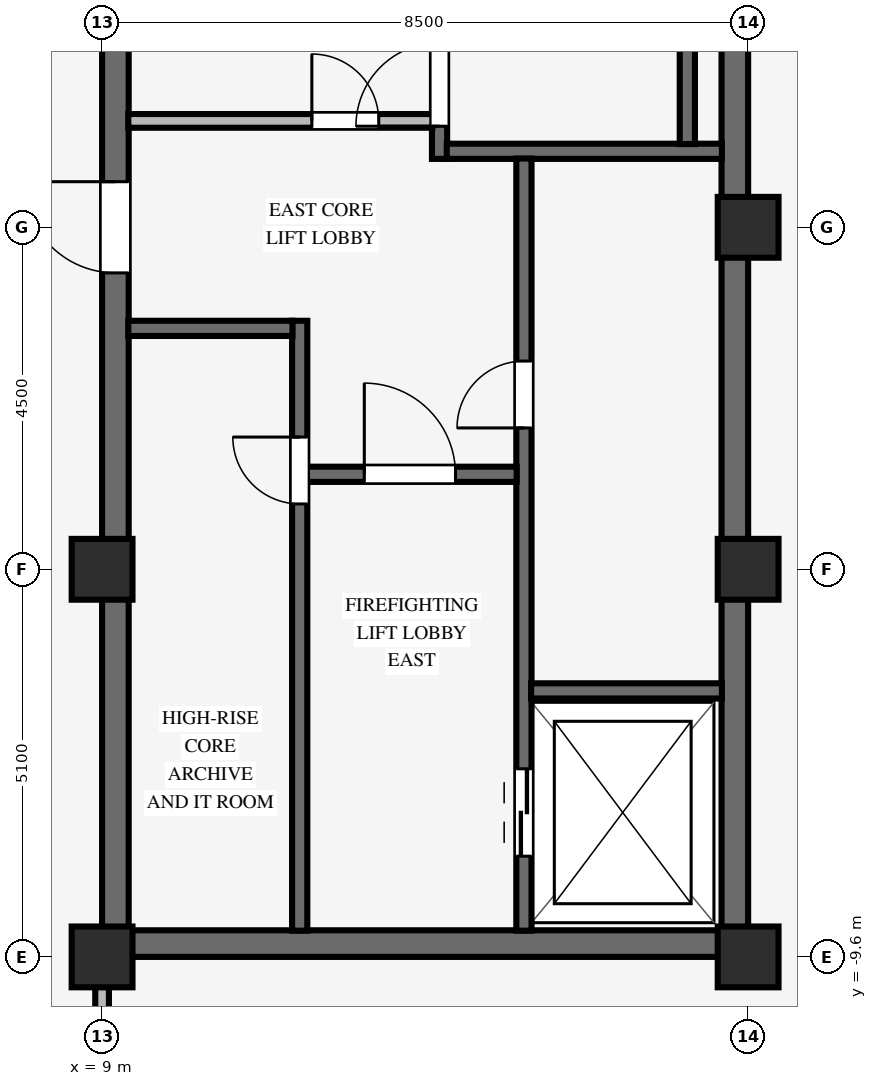
"""IFC4 building model, lengths in metres.
Left out: names, types, materials, properties, quantities, classifications, styles, units other than length and angle.
Written with IfcOpenShell. Run it as: python <this file> out.ifc"""

import sys

from ifc_helpers import new_model, si_unit, direction, frame, frame_2d, origin, origin_2d, place, context, subcontext, project, spatial, rectangle, extrude, source, transform, mapped, element, fill, save


model = new_model("IFC4")
c1 = context("Model", 3, precision=1e-05, world=origin(), true_north=direction((0.0, 1.0)))
c2 = subcontext(c1, "Body", "Model", "MODEL_VIEW")
j1 = project(units=[si_unit("LENGTHUNIT", "METRE"), si_unit("PLANEANGLEUNIT", "RADIAN")], contexts=[c1])
p1 = place(None, origin())
s1 = spatial("IfcSite", under=j1, at=p1, CompositionType="ELEMENT")
p2 = place(p1, origin())
s2 = spatial("IfcBuilding", under=s1, at=p2, CompositionType="ELEMENT")
p3 = place(p2, frame((0.0, 0.0, 245.65)))
s3 = spatial("IfcBuildingStorey", under=s2, at=p3, CompositionType="ELEMENT", Elevation=245.65)
p4 = place(p3, frame((9.0, -9.425, 0.0), z_axis=(0.0, 0.0, 1.0), x_axis=(1.0, 0.0, 0.0)))
e1 = element("IfcWall", 1, at=p4, inside=s3, PredefinedType="SHEAR", context=c2, shape_type="SweptSolid", body=[
    extrude(rectangle(XDim=8.5, YDim=0.35, at=frame_2d((4.25, 0.0))), origin(), (0.0, 0.0, 1.0), 3.37),
])
p5 = place(p3, frame((9.175, -9.255, 0.0), z_axis=(0.0, 0.0, 1.0), x_axis=(0.0, 1.0, 0.0)))
e2 = element("IfcWall", 2, at=p5, inside=s3, PredefinedType="SHEAR", context=c2, shape_type="SweptSolid", body=[
    extrude(rectangle(XDim=18.51, YDim=0.35, at=frame_2d((9.255, 0.0))), origin(), (0.0, 0.0, 1.0), 3.37),
])
p6 = place(p5, frame((8.655, 0.0, 0.0)))
e3 = element("IfcOpeningElement", 3, at=p6, cuts=e2, PredefinedType="OPENING", context=c2, shape_type="SweptSolid", body=[
    extrude(rectangle(XDim=1.2, YDim=2.15, at=frame_2d((0.6, 1.075))), frame((0.0, 0.185, 0.0), z_axis=(0.0, -1.0, 0.0), x_axis=(1.0, 0.0, 0.0)), (0.0, 0.0, 1.0), 0.37),
])
p7 = place(p3, frame((17.325, -9.255, 0.0), z_axis=(0.0, 0.0, 1.0), x_axis=(0.0, 1.0, 0.0)))
e4 = element("IfcWall", 4, at=p7, inside=s3, PredefinedType="SHEAR", context=c2, shape_type="SweptSolid", body=[
    extrude(rectangle(XDim=18.51, YDim=0.35, at=frame_2d((9.255, 0.0))), origin(), (0.0, 0.0, 1.0), 3.37),
])
for number, where, z_axis, x_axis in (
    (5, (9.0, -9.6, 0.0), (0.0, 0.0, 1.0), (1.0, 0.0, 0.0)),
    (6, (9.0, -4.5, 0.0), (0.0, 0.0, 1.0), (1.0, 0.0, 0.0)),
    (7, (17.5, -9.6, 0.0), (0.0, 0.0, 1.0), (1.0, 0.0, 0.0)),
    (8, (17.5, -4.5, 0.0), (0.0, 0.0, 1.0), (1.0, 0.0, 0.0)),
    (9, (17.5, 0.0, 0.0), (0.0, 0.0, 1.0), (1.0, 0.0, 0.0)),
):
    element("IfcColumn", number, at=place(p3, frame(where, z_axis=z_axis, x_axis=x_axis)), inside=s3, PredefinedType="COLUMN", context=c2, shape_type="SweptSolid", body=[
        extrude(rectangle(XDim=0.8, YDim=0.8, at=origin_2d()), origin(), (0.0, 0.0, 1.0), 3.37),
    ])
p8 = place(p3, frame((13.44, 0.9, 0.0), z_axis=(0.0, 0.0, 1.0), x_axis=(0.0, 1.0, 0.0)))
e10 = element("IfcWall", 10, at=p8, inside=s3, PredefinedType="SHEAR", context=c2, shape_type="SweptSolid", body=[
    extrude(rectangle(XDim=8.355, YDim=0.2, at=frame_2d((4.177, 0.0))), origin(), (0.0, 0.0, 1.0), 3.37),
])
p9 = place(p8, frame((0.43, 0.0, 0.0)))
e11 = element("IfcOpeningElement", 11, at=p9, cuts=e10, PredefinedType="OPENING", context=c2, shape_type="SweptSolid", body=[
    extrude(rectangle(XDim=1.1, YDim=2.15, at=frame_2d((0.55, 1.075))), frame((0.0, 0.11, 0.0), z_axis=(0.0, -1.0, 0.0), x_axis=(1.0, 0.0, 0.0)), (0.0, 0.0, 1.0), 0.22),
])
p10 = place(p3, frame((13.535, 1.0, 0.0), z_axis=(0.0, 0.0, 1.0), x_axis=(1.0, 0.0, 0.0)))
e12 = element("IfcWall", 12, at=p10, inside=s3, PredefinedType="SHEAR", context=c2, shape_type="SweptSolid", body=[
    extrude(rectangle(XDim=3.62, YDim=0.2, at=frame_2d((1.81, 0.0))), origin(), (0.0, 0.0, 1.0), 3.37),
])
p11 = place(p3, frame((16.7, 1.095, 0.0), z_axis=(0.0, 0.0, 1.0), x_axis=(0.0, 1.0, 0.0)))
e13 = element("IfcWall", 13, at=p11, inside=s3, PredefinedType="SHEAR", context=c2, shape_type="SweptSolid", body=[
    extrude(rectangle(XDim=8.16, YDim=0.2, at=frame_2d((4.08, 0.0))), origin(), (0.0, 0.0, 1.0), 3.37),
])
p12 = place(p3, frame((14.55, -9.255, 0.0), z_axis=(0.0, 0.0, 1.0), x_axis=(0.0, 1.0, 0.0)))
e14 = element("IfcWall", 14, at=p12, inside=s3, PredefinedType="SHEAR", context=c2, shape_type="SweptSolid", body=[
    extrude(rectangle(XDim=10.16, YDim=0.2, at=frame_2d((5.08, 0.0))), origin(), (0.0, 0.0, 1.0), 3.37),
])
p13 = place(p12, frame((6.615, 0.0, 0.0)))
e15 = element("IfcOpeningElement", 15, at=p13, cuts=e14, PredefinedType="OPENING", context=c2, shape_type="SweptSolid", body=[
    extrude(rectangle(XDim=0.88, YDim=2.1, at=frame_2d((0.44, 1.05))), frame((0.0, 0.11, 0.0), z_axis=(0.0, -1.0, 0.0), x_axis=(1.0, 0.0, 0.0)), (0.0, 0.0, 1.0), 0.22),
])
p14 = place(p12, frame((0.98, 0.0, 0.0)))
e16 = element("IfcOpeningElement", 16, at=p14, cuts=e14, PredefinedType="OPENING", context=c2, shape_type="SweptSolid", body=[
    extrude(rectangle(XDim=1.15, YDim=2.15, at=frame_2d((0.575, 1.075))), frame((0.0, 0.11, 0.0), z_axis=(0.0, -1.0, 0.0), x_axis=(1.0, 0.0, 0.0)), (0.0, 0.0, 1.0), 0.22),
])
p15 = place(p3, frame((14.645, -6.1, 0.0), z_axis=(0.0, 0.0, 1.0), x_axis=(1.0, 0.0, 0.0)))
e17 = element("IfcWall", 17, at=p15, inside=s3, PredefinedType="SHEAR", context=c2, shape_type="SweptSolid", body=[
    extrude(rectangle(XDim=2.51, YDim=0.2, at=frame_2d((1.255, 0.0))), origin(), (0.0, 0.0, 1.0), 3.37),
])
p16 = place(p3, frame((11.6, -9.255, 0.0), z_axis=(0.0, 0.0, 1.0), x_axis=(0.0, 1.0, 0.0)))
e18 = element("IfcWall", 18, at=p16, inside=s3, PredefinedType="SHEAR", context=c2, shape_type="SweptSolid", body=[
    extrude(rectangle(XDim=8.025, YDim=0.2, at=frame_2d((4.012, 0.0))), origin(), (0.0, 0.0, 1.0), 3.37),
])
p17 = place(p16, frame((5.615, 0.0, 0.0)))
e19 = element("IfcOpeningElement", 19, at=p17, cuts=e18, PredefinedType="OPENING", context=c2, shape_type="SweptSolid", body=[
    extrude(rectangle(XDim=0.88, YDim=2.1, at=frame_2d((0.44, 1.05))), frame((0.0, 0.11, 0.0), z_axis=(0.0, -1.0, 0.0), x_axis=(1.0, 0.0, 0.0)), (0.0, 0.0, 1.0), 0.22),
])
p18 = place(p3, frame((11.695, -3.25, 0.0), z_axis=(0.0, 0.0, 1.0), x_axis=(1.0, 0.0, 0.0)))
e20 = element("IfcWall", 20, at=p18, inside=s3, PredefinedType="SHEAR", context=c2, shape_type="SweptSolid", body=[
    extrude(rectangle(XDim=2.76, YDim=0.2, at=frame_2d((1.38, 0.0))), origin(), (0.0, 0.0, 1.0), 3.37),
])
p19 = place(p18, frame((0.755, 0.0, 0.0)))
e21 = element("IfcOpeningElement", 21, at=p19, cuts=e20, PredefinedType="OPENING", context=c2, shape_type="SweptSolid", body=[
    extrude(rectangle(XDim=1.2, YDim=2.15, at=frame_2d((0.6, 1.075))), frame((0.0, 0.11, 0.0), z_axis=(0.0, -1.0, 0.0), x_axis=(1.0, 0.0, 0.0)), (0.0, 0.0, 1.0), 0.22),
])
p20 = place(p3, frame((9.345, -1.33, 0.0), z_axis=(0.0, 0.0, 1.0), x_axis=(1.0, 0.0, 0.0)))
e22 = element("IfcWall", 22, at=p20, inside=s3, PredefinedType="SHEAR", context=c2, shape_type="SweptSolid", body=[
    extrude(rectangle(XDim=2.16, YDim=0.2, at=frame_2d((1.08, 0.0))), origin(), (0.0, 0.0, 1.0), 3.37),
])
p21 = place(p3, frame((9.345, 1.4, 0.0), z_axis=(0.0, 0.0, 1.0), x_axis=(1.0, 0.0, 0.0)))
e23 = element("IfcWall", 23, at=p21, inside=s3, PredefinedType="PARTITIONING", context=c2, shape_type="SweptSolid", body=[
    extrude(rectangle(XDim=4.0, YDim=0.18, at=frame_2d((2.0, 0.0))), origin(), (0.0, 0.0, 1.0), 3.36),
])
p22 = place(p21, frame((2.415, 0.0, 0.0)))
e24 = element("IfcOpeningElement", 24, at=p22, cuts=e23, PredefinedType="OPENING", context=c2, shape_type="SweptSolid", body=[
    extrude(rectangle(XDim=0.88, YDim=2.1, at=frame_2d((0.44, 1.05))), frame((0.0, 0.1, 0.0), z_axis=(0.0, -1.0, 0.0), x_axis=(1.0, 0.0, 0.0)), (0.0, 0.0, 1.0), 0.2),
])
p23 = place(p3, frame((9.0, -15.314, 0.0), z_axis=(0.0, 0.0, 1.0), x_axis=(0.0, 1.0, 0.0)))
e25 = element("IfcWall", 25, at=p23, inside=s3, PredefinedType="PARTITIONING", context=c2, shape_type="SweptSolid", body=[
    extrude(rectangle(XDim=5.318, YDim=0.18, at=frame_2d((2.659, 0.0))), origin(), (0.0, 0.0, 1.0), 2.892),
])
p24 = place(p23, frame((2.179, 0.0, 0.0)))
e26 = element("IfcOpeningElement", 26, at=p24, cuts=e25, PredefinedType="OPENING", context=c2, shape_type="SweptSolid", body=[
    extrude(rectangle(XDim=0.96, YDim=2.1, at=frame_2d((0.48, 1.05))), frame((0.0, 0.1, 0.0), z_axis=(0.0, -1.0, 0.0), x_axis=(1.0, 0.0, 0.0)), (0.0, 0.0, 1.0), 0.2),
])
m1 = source(origin(), c2, "Body", "SweptSolid", [
    extrude(rectangle(XDim=1.1, YDim=2.15, at=frame_2d((0.55, 1.075))), frame((0.0, 0.025, 0.0), z_axis=(0.0, -1.0, 0.0), x_axis=(1.0, 0.0, 0.0)), (0.0, 0.0, 1.0), 0.05),
])
p25 = place(p9, origin())
e27 = element("IfcDoor", 27, at=p25, inside=s3, OperationType="SINGLE_SWING_LEFT", PredefinedType="DOOR", context=c2, shape_type="MappedRepresentation", body=[
    mapped(m1, transform((0.0, 0.0, 0.0), scale=1.0)),
])
fill(e11, e27)
m2 = source(origin(), c2, "Body", "SweptSolid", [
    extrude(rectangle(XDim=0.88, YDim=2.1, at=frame_2d((0.44, 1.05))), frame((0.0, 0.025, 0.0), z_axis=(0.0, -1.0, 0.0), x_axis=(1.0, 0.0, 0.0)), (0.0, 0.0, 1.0), 0.05),
])
p26 = place(p13, origin())
e28 = element("IfcDoor", 28, at=p26, inside=s3, OperationType="SINGLE_SWING_LEFT", PredefinedType="DOOR", context=c2, shape_type="MappedRepresentation", body=[
    mapped(m2, transform((0.0, 0.0, 0.0), scale=1.0)),
])
fill(e15, e28)
m3 = source(origin(), c2, "Body", "SweptSolid", [
    extrude(rectangle(XDim=1.2, YDim=2.15, at=frame_2d((0.6, 1.075))), frame((0.0, 0.025, 0.0), z_axis=(0.0, -1.0, 0.0), x_axis=(1.0, 0.0, 0.0)), (0.0, 0.0, 1.0), 0.05),
])
p27 = place(p19, origin())
e29 = element("IfcDoor", 29, at=p27, inside=s3, OperationType="SINGLE_SWING_LEFT", PredefinedType="DOOR", context=c2, shape_type="MappedRepresentation", body=[
    mapped(m3, transform((0.0, 0.0, 0.0), scale=1.0)),
])
fill(e21, e29)
p28 = place(p17, origin())
e30 = element("IfcDoor", 30, at=p28, inside=s3, OperationType="SINGLE_SWING_RIGHT", PredefinedType="DOOR", context=c2, shape_type="MappedRepresentation", body=[
    mapped(m2, transform((0.0, 0.0, 0.0), scale=1.0)),
])
fill(e19, e30)
p29 = place(p6, origin())
e31 = element("IfcDoor", 31, at=p29, inside=s3, OperationType="SINGLE_SWING_RIGHT", PredefinedType="DOOR", context=c2, shape_type="MappedRepresentation", body=[
    mapped(m3, transform((0.0, 0.0, 0.0), scale=1.0)),
])
fill(e3, e31)
p30 = place(p22, origin())
e32 = element("IfcDoor", 32, at=p30, inside=s3, OperationType="SINGLE_SWING_LEFT", PredefinedType="DOOR", context=c2, shape_type="MappedRepresentation", body=[
    mapped(m2, transform((0.0, 0.0, 0.0), scale=1.0)),
])
fill(e24, e32)
m4 = source(origin(), c2, "Body", "SweptSolid", [
    extrude(rectangle(XDim=1.15, YDim=2.15, at=frame_2d((0.575, 1.075))), frame((0.0, 0.025, 0.0), z_axis=(0.0, -1.0, 0.0), x_axis=(1.0, 0.0, 0.0)), (0.0, 0.0, 1.0), 0.05),
])
p31 = place(p14, origin())
e33 = element("IfcDoor", 33, at=p31, inside=s3, OperationType="DOUBLE_DOOR_SLIDING", PredefinedType="DOOR", context=c2, shape_type="MappedRepresentation", body=[
    mapped(m4, transform((0.0, 0.0, 0.0), scale=1.0)),
])
fill(e16, e33)
save(model, sys.argv[1])
